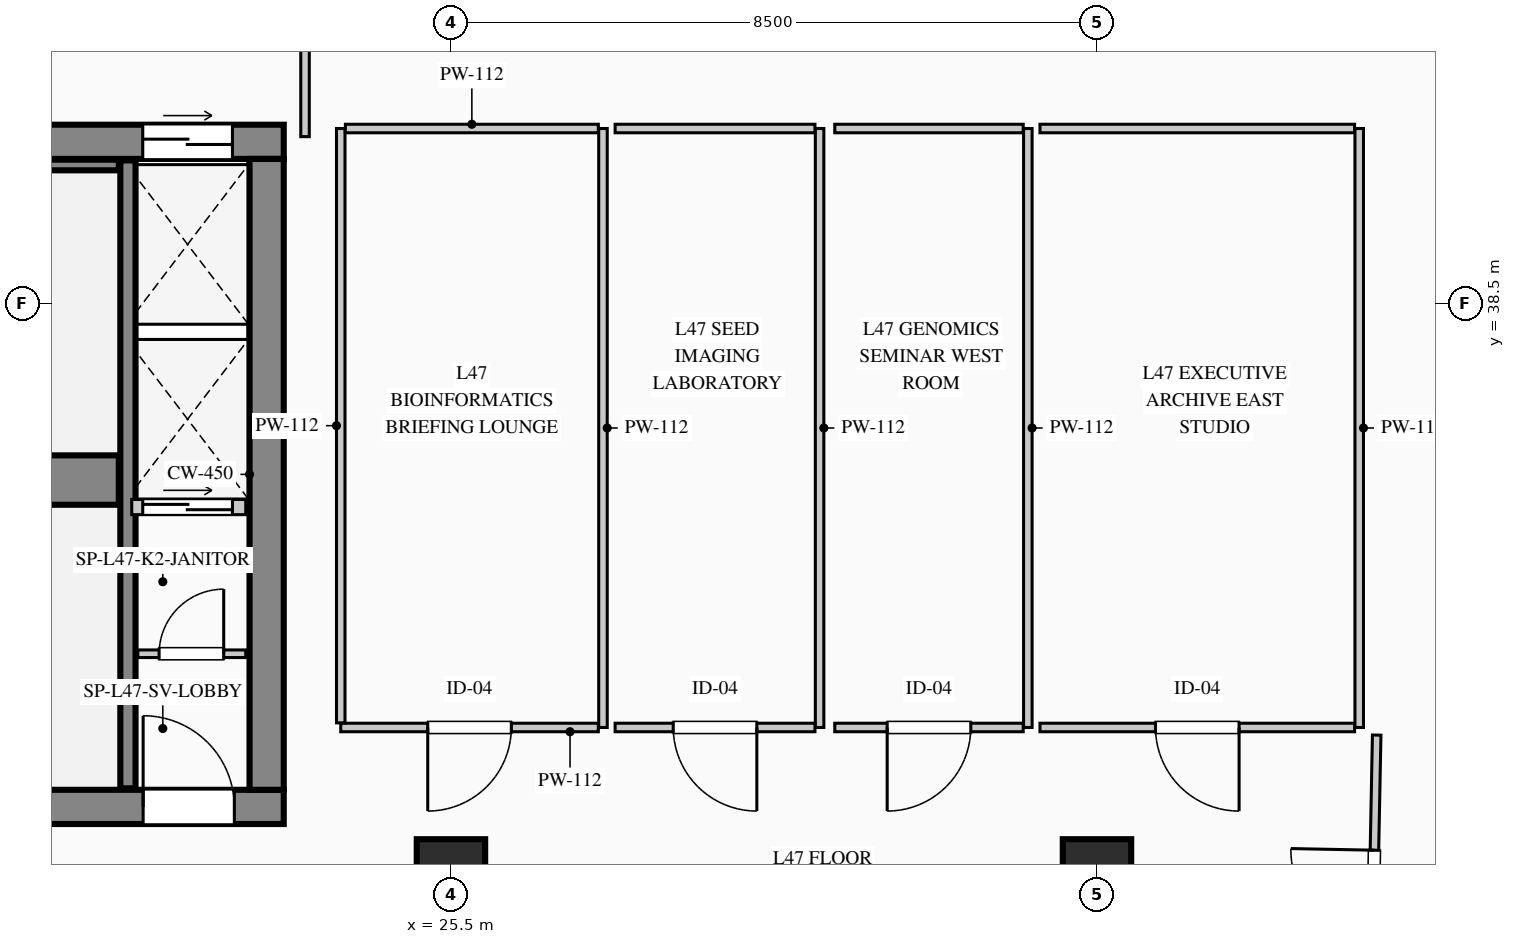
"""IFC4 building model, lengths in metres.
Left out: names, types, materials, properties, quantities, classifications, styles, units other than length and angle.
Written with IfcOpenShell. Run it as: python <this file> out.ifc"""

import sys

from ifc_helpers import new_model, si_unit, direction, frame, frame_2d, origin, origin_2d, place, context, subcontext, project, spatial, rectangle, extrude, element, fill, save


model = new_model("IFC4")
c1 = context("Model", 3, precision=1e-05, world=origin(), true_north=direction((0.0, 1.0)))
c2 = subcontext(c1, "Body", "Model", "MODEL_VIEW")
j1 = project(units=[si_unit("LENGTHUNIT", "METRE"), si_unit("PLANEANGLEUNIT", "RADIAN")], contexts=[c1])
p1 = place(None, origin())
s1 = spatial("IfcSite", under=j1, at=p1, CompositionType="ELEMENT")
p2 = place(p1, origin())
s2 = spatial("IfcBuilding", under=s1, at=p2, CompositionType="ELEMENT")
p3 = place(p2, frame((0.0, 0.0, 199.55)))
s3 = spatial("IfcBuildingStorey", under=s2, at=p3, CompositionType="ELEMENT", Elevation=199.55)
p4 = place(p3, frame((5.55, 40.625, 0.0), z_axis=(0.0, 0.0, 1.0), x_axis=(1.0, 0.0, 0.0)))
e1 = element("IfcWall", 1, at=p4, inside=s3, PredefinedType="SHEAR", context=c2, shape_type="SweptSolid", body=[
    extrude(rectangle(XDim=17.75, YDim=0.45, at=frame_2d((8.875, 0.0))), origin(), (0.0, 0.0, 1.0), 3.95),
])
p5 = place(p4, frame((15.895, 0.0, 0.0)))
e2 = element("IfcOpeningElement", 2, at=p5, cuts=e1, PredefinedType="OPENING", context=c2, shape_type="SweptSolid", body=[
    extrude(rectangle(XDim=1.18, YDim=2.25, at=frame_2d((0.59, 1.125))), frame((0.0, 0.235, 0.0), z_axis=(0.0, -1.0, 0.0), x_axis=(1.0, 0.0, 0.0)), (0.0, 0.0, 1.0), 0.47),
])
p6 = place(p3, frame((5.55, 31.875, 0.0), z_axis=(0.0, 0.0, 1.0), x_axis=(1.0, 0.0, 0.0)))
e3 = element("IfcWall", 3, at=p6, inside=s3, PredefinedType="SHEAR", context=c2, shape_type="SweptSolid", body=[
    extrude(rectangle(XDim=17.75, YDim=0.45, at=frame_2d((8.875, 0.0))), origin(), (0.0, 0.0, 1.0), 3.95),
])
p7 = place(p6, frame((3.1, 0.0, 0.0)))
e4 = element("IfcOpeningElement", 4, at=p7, cuts=e3, PredefinedType="OPENING", context=c2, shape_type="SweptSolid", body=[
    extrude(rectangle(XDim=1.2, YDim=2.2, at=frame_2d((0.6, 1.1))), frame((0.0, 0.235, 0.0), z_axis=(0.0, -1.0, 0.0), x_axis=(1.0, 0.0, 0.0)), (0.0, 0.0, 1.0), 0.47),
])
p8 = place(p6, frame((6.95, 0.0, 0.0)))
e5 = element("IfcOpeningElement", 5, at=p8, cuts=e3, PredefinedType="OPENING", context=c2, shape_type="SweptSolid", body=[
    extrude(rectangle(XDim=1.2, YDim=2.2, at=frame_2d((0.6, 1.1))), frame((0.0, 0.235, 0.0), z_axis=(0.0, -1.0, 0.0), x_axis=(1.0, 0.0, 0.0)), (0.0, 0.0, 1.0), 0.47),
])
p9 = place(p6, frame((8.8, 0.0, 0.0)))
e6 = element("IfcOpeningElement", 6, at=p9, cuts=e3, PredefinedType="OPENING", context=c2, shape_type="SweptSolid", body=[
    extrude(rectangle(XDim=1.15, YDim=2.2, at=frame_2d((0.575, 1.1))), frame((0.0, 0.235, 0.0), z_axis=(0.0, -1.0, 0.0), x_axis=(1.0, 0.0, 0.0)), (0.0, 0.0, 1.0), 0.47),
])
p10 = place(p6, frame((15.9, 0.0, 0.0)))
e7 = element("IfcOpeningElement", 7, at=p10, cuts=e3, PredefinedType="OPENING", context=c2, shape_type="SweptSolid", body=[
    extrude(rectangle(XDim=1.2, YDim=2.2, at=frame_2d((0.6, 1.1))), frame((0.0, 0.235, 0.0), z_axis=(0.0, -1.0, 0.0), x_axis=(1.0, 0.0, 0.0)), (0.0, 0.0, 1.0), 0.47),
])
p11 = place(p3, frame((23.075, 32.1, 0.0), z_axis=(0.0, 0.0, 1.0), x_axis=(0.0, 1.0, 0.0)))
e8 = element("IfcWall", 8, at=p11, inside=s3, PredefinedType="SHEAR", context=c2, shape_type="SweptSolid", body=[
    extrude(rectangle(XDim=8.3, YDim=0.45, at=frame_2d((4.15, 0.0))), origin(), (0.0, 0.0, 1.0), 3.95),
])
p12 = place(p3, frame((14.12, 36.175, 0.0), z_axis=(0.0, 0.0, 1.0), x_axis=(1.0, 0.0, 0.0)))
e9 = element("IfcWall", 9, at=p12, inside=s3, PredefinedType="SHEAR", context=c2, shape_type="SweptSolid", body=[
    extrude(rectangle(XDim=7.01, YDim=0.65, at=frame_2d((3.505, 0.0))), origin(), (0.0, 0.0, 1.0), 3.95),
])
p13 = place(p3, frame((21.25, 32.12, 0.0), z_axis=(0.0, 0.0, 1.0), x_axis=(0.0, 1.0, 0.0)))
e10 = element("IfcWall", 10, at=p13, inside=s3, PredefinedType="SHEAR", context=c2, shape_type="SweptSolid", body=[
    extrude(rectangle(XDim=8.26, YDim=0.2, at=frame_2d((4.13, 0.0))), origin(), (0.0, 0.0, 1.0), 3.95),
])
p14 = place(p3, frame((14.12, 40.32, 0.0), z_axis=(0.0, 0.0, 1.0), x_axis=(1.0, 0.0, 0.0)))
e11 = element("IfcWall", 11, at=p14, inside=s3, PredefinedType="SHEAR", context=c2, shape_type="SweptSolid", body=[
    extrude(rectangle(XDim=7.01, YDim=0.14, at=frame_2d((3.505, 0.0))), origin(), (0.0, 0.0, 1.0), 3.95),
])
for number, where, z_axis, x_axis in (
    (12, (25.5, 31.0, 0.0), (0.0, 0.0, 1.0), (1.0, 0.0, 0.0)),
    (13, (34.0, 31.0, 0.0), (0.0, 0.0, 1.0), (1.0, 0.0, 0.0)),
):
    element("IfcColumn", number, at=place(p3, frame(where, z_axis=z_axis, x_axis=x_axis)), inside=s3, PredefinedType="COLUMN", context=c2, shape_type="SweptSolid", body=[
        extrude(rectangle(XDim=0.9, YDim=0.9, at=origin_2d()), origin(), (0.0, 0.0, 1.0), 3.95),
    ])
p15 = place(p3, frame((21.38, 33.89, 0.0), z_axis=(0.0, 0.0, 1.0), x_axis=(1.0, 0.0, 0.0)))
e14 = element("IfcWall", 14, at=p15, inside=s3, PredefinedType="PARTITIONING", context=c2, shape_type="SweptSolid", body=[
    extrude(rectangle(XDim=1.42, YDim=0.1, at=frame_2d((0.71, 0.0))), origin(), (0.0, 0.0, 1.0), 3.7),
])
p16 = place(p15, frame((0.28, 0.0, 0.0)))
e15 = element("IfcOpeningElement", 15, at=p16, cuts=e14, PredefinedType="OPENING", context=c2, shape_type="SweptSolid", body=[
    extrude(rectangle(XDim=0.85, YDim=2.1, at=frame_2d((0.425, 1.05))), frame((0.0, 0.06, 0.0), z_axis=(0.0, -1.0, 0.0), x_axis=(1.0, 0.0, 0.0)), (0.0, 0.0, 1.0), 0.12),
])
p17 = place(p3, frame((21.3, 35.82, 0.0), z_axis=(0.0, 0.0, 1.0), x_axis=(1.0, 0.0, 0.0)))
e16 = element("IfcWall", 16, at=p17, inside=s3, PredefinedType="PARTITIONING", context=c2, shape_type="SweptSolid", body=[
    extrude(rectangle(XDim=1.5, YDim=0.2, at=frame_2d((0.75, 0.0))), origin(), (0.0, 0.0, 1.0), 3.7),
])
p18 = place(p17, frame((0.145, 0.0, 0.0)))
e17 = element("IfcOpeningElement", 17, at=p18, cuts=e16, PredefinedType="OPENING", context=c2, shape_type="SweptSolid", body=[
    extrude(rectangle(XDim=1.18, YDim=2.25, at=frame_2d((0.59, 1.125))), frame((0.0, 0.11, 0.0), z_axis=(0.0, -1.0, 0.0), x_axis=(1.0, 0.0, 0.0)), (0.0, 0.0, 1.0), 0.22),
])
p19 = place(p3, frame((27.5, 40.8, 0.0), z_axis=(0.0, 0.0, 1.0), x_axis=(0.0, -1.0, 0.0)))
e18 = element("IfcWall", 18, at=p19, inside=s3, PredefinedType="PARTITIONING", context=c2, shape_type="SweptSolid", body=[
    extrude(rectangle(XDim=7.88, YDim=0.112, at=frame_2d((3.94, 0.0))), origin(), (0.0, 0.0, 1.0), 3.7),
])
p20 = place(p3, frame((27.439, 32.92, 0.0), z_axis=(0.0, 0.0, 1.0), x_axis=(-1.0, 0.0, 0.0)))
e19 = element("IfcWall", 19, at=p20, inside=s3, PredefinedType="PARTITIONING", context=c2, shape_type="SweptSolid", body=[
    extrude(rectangle(XDim=3.389, YDim=0.112, at=frame_2d((1.694, 0.0))), origin(), (0.0, 0.0, 1.0), 3.7),
])
p21 = place(p20, frame((1.145, 0.0, 0.0)))
e20 = element("IfcOpeningElement", 20, at=p21, cuts=e19, PredefinedType="OPENING", context=c2, shape_type="SweptSolid", body=[
    extrude(rectangle(XDim=1.1, YDim=2.2, at=frame_2d((0.55, 1.1))), frame((0.0, 0.066, 0.0), z_axis=(0.0, -1.0, 0.0), x_axis=(1.0, 0.0, 0.0)), (0.0, 0.0, 1.0), 0.132),
])
p22 = place(p3, frame((24.05, 32.981, 0.0), z_axis=(0.0, 0.0, 1.0), x_axis=(0.0, 1.0, 0.0)))
e21 = element("IfcWall", 21, at=p22, inside=s3, PredefinedType="PARTITIONING", context=c2, shape_type="SweptSolid", body=[
    extrude(rectangle(XDim=7.819, YDim=0.112, at=frame_2d((3.91, 0.0))), origin(), (0.0, 0.0, 1.0), 3.7),
])
p23 = place(p3, frame((24.111, 40.8, 0.0), z_axis=(0.0, 0.0, 1.0), x_axis=(1.0, 0.0, 0.0)))
e22 = element("IfcWall", 22, at=p23, inside=s3, PredefinedType="PARTITIONING", context=c2, shape_type="SweptSolid", body=[
    extrude(rectangle(XDim=3.328, YDim=0.112, at=frame_2d((1.664, 0.0))), origin(), (0.0, 0.0, 1.0), 3.7),
])
p24 = place(p3, frame((30.35, 40.8, 0.0), z_axis=(0.0, 0.0, 1.0), x_axis=(0.0, -1.0, 0.0)))
e23 = element("IfcWall", 23, at=p24, inside=s3, PredefinedType="PARTITIONING", context=c2, shape_type="SweptSolid", body=[
    extrude(rectangle(XDim=7.88, YDim=0.112, at=frame_2d((3.94, 0.0))), origin(), (0.0, 0.0, 1.0), 3.7),
])
p25 = place(p3, frame((30.289, 32.92, 0.0), z_axis=(0.0, 0.0, 1.0), x_axis=(-1.0, 0.0, 0.0)))
e24 = element("IfcWall", 24, at=p25, inside=s3, PredefinedType="PARTITIONING", context=c2, shape_type="SweptSolid", body=[
    extrude(rectangle(XDim=2.629, YDim=0.112, at=frame_2d((1.314, 0.0))), origin(), (0.0, 0.0, 1.0), 3.7),
])
p26 = place(p25, frame((0.764, 0.0, 0.0)))
e25 = element("IfcOpeningElement", 25, at=p26, cuts=e24, PredefinedType="OPENING", context=c2, shape_type="SweptSolid", body=[
    extrude(rectangle(XDim=1.1, YDim=2.2, at=frame_2d((0.55, 1.1))), frame((0.0, 0.066, 0.0), z_axis=(0.0, -1.0, 0.0), x_axis=(1.0, 0.0, 0.0)), (0.0, 0.0, 1.0), 0.132),
])
p27 = place(p3, frame((27.66, 40.8, 0.0), z_axis=(0.0, 0.0, 1.0), x_axis=(1.0, 0.0, 0.0)))
e26 = element("IfcWall", 26, at=p27, inside=s3, PredefinedType="PARTITIONING", context=c2, shape_type="SweptSolid", body=[
    extrude(rectangle(XDim=2.629, YDim=0.112, at=frame_2d((1.314, 0.0))), origin(), (0.0, 0.0, 1.0), 3.7),
])
p28 = place(p3, frame((33.09, 40.8, 0.0), z_axis=(0.0, 0.0, 1.0), x_axis=(0.0, -1.0, 0.0)))
e27 = element("IfcWall", 27, at=p28, inside=s3, PredefinedType="PARTITIONING", context=c2, shape_type="SweptSolid", body=[
    extrude(rectangle(XDim=7.88, YDim=0.112, at=frame_2d((3.94, 0.0))), origin(), (0.0, 0.0, 1.0), 3.7),
])
p29 = place(p3, frame((33.029, 32.92, 0.0), z_axis=(0.0, 0.0, 1.0), x_axis=(-1.0, 0.0, 0.0)))
e28 = element("IfcWall", 28, at=p29, inside=s3, PredefinedType="PARTITIONING", context=c2, shape_type="SweptSolid", body=[
    extrude(rectangle(XDim=2.479, YDim=0.112, at=frame_2d((1.24, 0.0))), origin(), (0.0, 0.0, 1.0), 3.7),
])
p30 = place(p29, frame((0.689, 0.0, 0.0)))
e29 = element("IfcOpeningElement", 29, at=p30, cuts=e28, PredefinedType="OPENING", context=c2, shape_type="SweptSolid", body=[
    extrude(rectangle(XDim=1.1, YDim=2.2, at=frame_2d((0.55, 1.1))), frame((0.0, 0.066, 0.0), z_axis=(0.0, -1.0, 0.0), x_axis=(1.0, 0.0, 0.0)), (0.0, 0.0, 1.0), 0.132),
])
p31 = place(p3, frame((30.55, 40.8, 0.0), z_axis=(0.0, 0.0, 1.0), x_axis=(1.0, 0.0, 0.0)))
e30 = element("IfcWall", 30, at=p31, inside=s3, PredefinedType="PARTITIONING", context=c2, shape_type="SweptSolid", body=[
    extrude(rectangle(XDim=2.479, YDim=0.112, at=frame_2d((1.24, 0.0))), origin(), (0.0, 0.0, 1.0), 3.7),
])
p32 = place(p3, frame((37.45, 40.8, 0.0), z_axis=(0.0, 0.0, 1.0), x_axis=(0.0, -1.0, 0.0)))
e31 = element("IfcWall", 31, at=p32, inside=s3, PredefinedType="PARTITIONING", context=c2, shape_type="SweptSolid", body=[
    extrude(rectangle(XDim=7.88, YDim=0.112, at=frame_2d((3.94, 0.0))), origin(), (0.0, 0.0, 1.0), 3.7),
])
p33 = place(p3, frame((37.389, 32.92, 0.0), z_axis=(0.0, 0.0, 1.0), x_axis=(-1.0, 0.0, 0.0)))
e32 = element("IfcWall", 32, at=p33, inside=s3, PredefinedType="PARTITIONING", context=c2, shape_type="SweptSolid", body=[
    extrude(rectangle(XDim=4.139, YDim=0.112, at=frame_2d((2.069, 0.0))), origin(), (0.0, 0.0, 1.0), 3.7),
])
p34 = place(p33, frame((1.52, 0.0, 0.0)))
e33 = element("IfcOpeningElement", 33, at=p34, cuts=e32, PredefinedType="OPENING", context=c2, shape_type="SweptSolid", body=[
    extrude(rectangle(XDim=1.1, YDim=2.2, at=frame_2d((0.55, 1.1))), frame((0.0, 0.066, 0.0), z_axis=(0.0, -1.0, 0.0), x_axis=(1.0, 0.0, 0.0)), (0.0, 0.0, 1.0), 0.132),
])
p35 = place(p3, frame((33.25, 40.8, 0.0), z_axis=(0.0, 0.0, 1.0), x_axis=(1.0, 0.0, 0.0)))
e34 = element("IfcWall", 34, at=p35, inside=s3, PredefinedType="PARTITIONING", context=c2, shape_type="SweptSolid", body=[
    extrude(rectangle(XDim=4.139, YDim=0.112, at=frame_2d((2.069, 0.0))), origin(), (0.0, 0.0, 1.0), 3.7),
])
p36 = place(p3, frame((23.58, 40.693, 0.0), z_axis=(0.0, 0.0, 1.0), x_axis=(0.0, 1.0, 0.0)))
e35 = element("IfcWall", 35, at=p36, inside=s3, PredefinedType="PARTITIONING", context=c2, shape_type="SweptSolid", body=[
    extrude(rectangle(XDim=2.542, YDim=0.112, at=frame_2d((1.271, 0.0))), origin(), (0.0, 0.0, 1.0), 3.7),
])
p37 = place(p3, frame((37.599, 28.691, 0.0), z_axis=(0.0, 0.0, 1.0), x_axis=(0.019566997539, 0.999808547977, 0.0)))
e36 = element("IfcWall", 36, at=p37, inside=s3, PredefinedType="PARTITIONING", context=c2, shape_type="SweptSolid", body=[
    extrude(rectangle(XDim=4.13, YDim=0.112, at=frame_2d((2.065, 0.0))), origin(), (0.0, 0.0, 1.0), 3.7),
])
p38 = place(p37, frame((1.515, 0.0, 0.0)))
e37 = element("IfcOpeningElement", 37, at=p38, cuts=e36, PredefinedType="OPENING", context=c2, shape_type="SweptSolid", body=[
    extrude(rectangle(XDim=1.1, YDim=2.2, at=frame_2d((0.55, 1.1))), frame((0.0, 0.066, 0.0), z_axis=(0.0, -1.0, 0.0), x_axis=(1.0, 0.0, 0.0)), (0.0, 0.0, 1.0), 0.132),
])
p39 = place(p10, origin())
e38 = element("IfcDoor", 38, at=p39, inside=s3, OperationType="SINGLE_SWING_LEFT", PredefinedType="DOOR", context=c2, shape_type="SweptSolid", body=[
    extrude(rectangle(XDim=1.2, YDim=2.2, at=frame_2d((0.6, 1.1))), frame((0.0, 0.025, 0.0), z_axis=(0.0, -1.0, 0.0), x_axis=(1.0, 0.0, 0.0)), (0.0, 0.0, 1.0), 0.05),
])
fill(e7, e38)
p40 = place(p16, origin())
e39 = element("IfcDoor", 39, at=p40, inside=s3, OperationType="SINGLE_SWING_RIGHT", PredefinedType="DOOR", context=c2, shape_type="SweptSolid", body=[
    extrude(rectangle(XDim=0.85, YDim=2.1, at=frame_2d((0.425, 1.05))), frame((0.0, 0.025, 0.0), z_axis=(0.0, -1.0, 0.0), x_axis=(1.0, 0.0, 0.0)), (0.0, 0.0, 1.0), 0.05),
])
fill(e15, e39)
p41 = place(p5, origin())
e40 = element("IfcDoor", 40, at=p41, inside=s3, OperationType="DOUBLE_DOOR_SLIDING", PredefinedType="DOOR", context=c2, shape_type="SweptSolid", body=[
    extrude(rectangle(XDim=1.18, YDim=2.25, at=frame_2d((0.59, 1.125))), frame((0.0, 0.025, 0.0), z_axis=(0.0, -1.0, 0.0), x_axis=(1.0, 0.0, 0.0)), (0.0, 0.0, 1.0), 0.05),
])
fill(e2, e40)
p42 = place(p18, origin())
e41 = element("IfcDoor", 41, at=p42, inside=s3, OperationType="DOUBLE_DOOR_SLIDING", PredefinedType="DOOR", context=c2, shape_type="SweptSolid", body=[
    extrude(rectangle(XDim=1.18, YDim=2.25, at=frame_2d((0.59, 1.125))), frame((0.0, 0.025, 0.0), z_axis=(0.0, -1.0, 0.0), x_axis=(1.0, 0.0, 0.0)), (0.0, 0.0, 1.0), 0.05),
])
fill(e17, e41)
p43 = place(p21, origin())
e42 = element("IfcDoor", 42, at=p43, inside=s3, OperationType="SINGLE_SWING_RIGHT", PredefinedType="DOOR", context=c2, shape_type="SweptSolid", body=[
    extrude(rectangle(XDim=1.1, YDim=2.2, at=frame_2d((0.55, 1.1))), frame((0.0, 0.025, 0.0), z_axis=(0.0, -1.0, 0.0), x_axis=(1.0, 0.0, 0.0)), (0.0, 0.0, 1.0), 0.05),
])
fill(e20, e42)
p44 = place(p26, origin())
e43 = element("IfcDoor", 43, at=p44, inside=s3, OperationType="SINGLE_SWING_LEFT", PredefinedType="DOOR", context=c2, shape_type="SweptSolid", body=[
    extrude(rectangle(XDim=1.1, YDim=2.2, at=frame_2d((0.55, 1.1))), frame((0.0, 0.025, 0.0), z_axis=(0.0, -1.0, 0.0), x_axis=(1.0, 0.0, 0.0)), (0.0, 0.0, 1.0), 0.05),
])
fill(e25, e43)
p45 = place(p30, origin())
e44 = element("IfcDoor", 44, at=p45, inside=s3, OperationType="SINGLE_SWING_RIGHT", PredefinedType="DOOR", context=c2, shape_type="SweptSolid", body=[
    extrude(rectangle(XDim=1.1, YDim=2.2, at=frame_2d((0.55, 1.1))), frame((0.0, 0.025, 0.0), z_axis=(0.0, -1.0, 0.0), x_axis=(1.0, 0.0, 0.0)), (0.0, 0.0, 1.0), 0.05),
])
fill(e29, e44)
p46 = place(p34, origin())
e45 = element("IfcDoor", 45, at=p46, inside=s3, OperationType="SINGLE_SWING_LEFT", PredefinedType="DOOR", context=c2, shape_type="SweptSolid", body=[
    extrude(rectangle(XDim=1.1, YDim=2.2, at=frame_2d((0.55, 1.1))), frame((0.0, 0.025, 0.0), z_axis=(0.0, -1.0, 0.0), x_axis=(1.0, 0.0, 0.0)), (0.0, 0.0, 1.0), 0.05),
])
fill(e33, e45)
p47 = place(p38, origin())
e46 = element("IfcDoor", 46, at=p47, inside=s3, OperationType="SINGLE_SWING_RIGHT", PredefinedType="DOOR", context=c2, shape_type="SweptSolid", body=[
    extrude(rectangle(XDim=1.1, YDim=2.2, at=frame_2d((0.55, 1.1))), frame((0.0, 0.025, 0.0), z_axis=(0.0, -1.0, 0.0), x_axis=(1.0, 0.0, 0.0)), (0.0, 0.0, 1.0), 0.05),
])
fill(e37, e46)
save(model, sys.argv[1])
